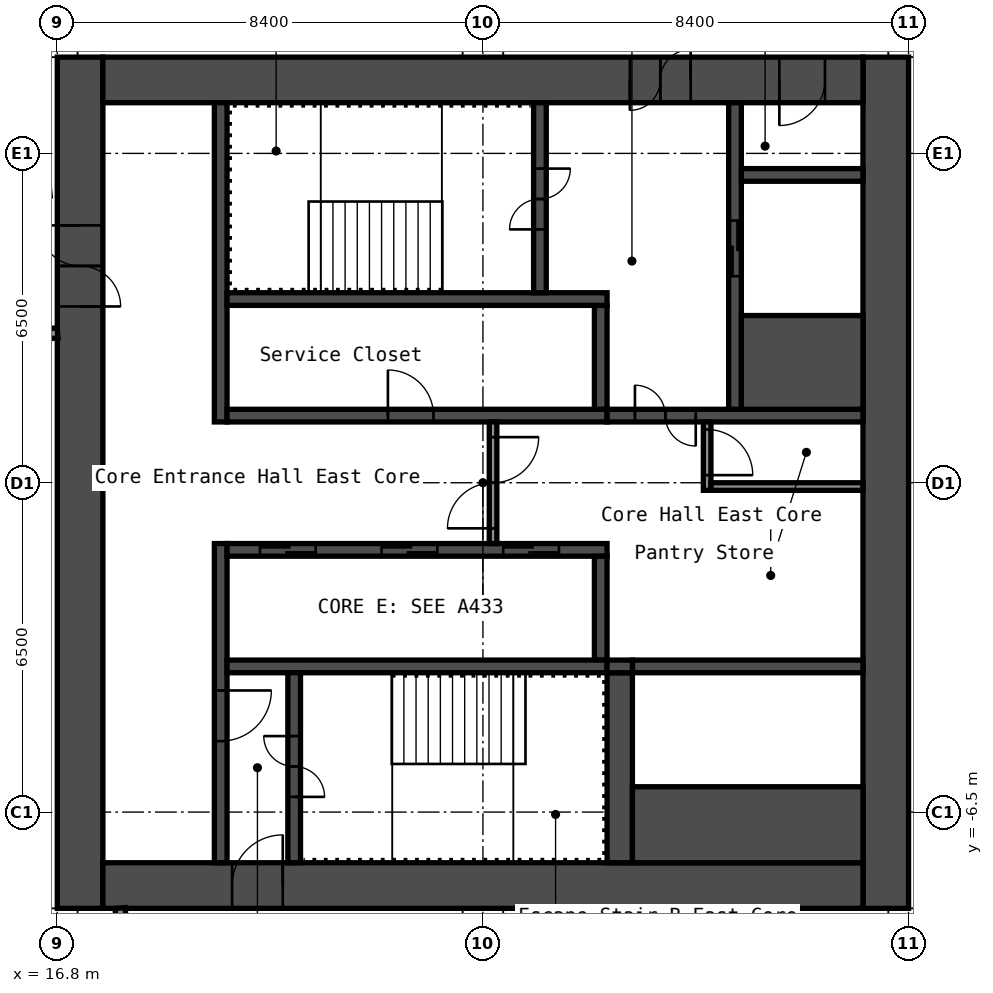
"""IFC4 building model, lengths in metres.
Left out: names, types, materials, properties, quantities, classifications, styles, units other than length and angle.
Written with IfcOpenShell. Run it as: python <this file> out.ifc"""

import sys

from ifc_helpers import new_model, si_unit, direction, frame, frame_2d, origin, place, context, subcontext, project, spatial, rectangle, extrude, element, fill, save


model = new_model("IFC4")
c1 = context("Model", 3, precision=1e-05, world=origin(), true_north=direction((0.0, 1.0)))
c2 = subcontext(c1, "Body", "Model", "MODEL_VIEW")
j1 = project(units=[si_unit("LENGTHUNIT", "METRE"), si_unit("PLANEANGLEUNIT", "RADIAN")], contexts=[c1])
p1 = place(None, origin())
s1 = spatial("IfcSite", under=j1, at=p1, CompositionType="ELEMENT")
p2 = place(p1, origin())
s2 = spatial("IfcBuilding", under=s1, at=p2, CompositionType="ELEMENT")
p3 = place(p2, frame((0.0, 0.0, 228.2)))
s3 = spatial("IfcBuildingStorey", under=s2, at=p3, CompositionType="ELEMENT", Elevation=228.2)
p4 = place(p3, frame((17.25, -8.4, 0.0), z_axis=(0.0, 0.0, 1.0), x_axis=(0.0, 1.0, 0.0)))
e1 = element("IfcWall", 1, at=p4, inside=s3, PredefinedType="SHEAR", context=c2, shape_type="SweptSolid", body=[
    extrude(rectangle(XDim=16.8, YDim=0.9, at=frame_2d((8.4, 0.0))), origin(), (0.0, 0.0, 1.0), 4.1),
])
p5 = place(p4, frame((11.879, 0.0, 0.0)))
e2 = element("IfcOpeningElement", 2, at=p5, cuts=e1, PredefinedType="OPENING", context=c2, shape_type="SweptSolid", body=[
    extrude(rectangle(XDim=1.6, YDim=2.1, at=frame_2d((0.8, 1.05))), frame((0.0, 0.46, 0.0), z_axis=(0.0, -1.0, 0.0), x_axis=(1.0, 0.0, 0.0)), (0.0, 0.0, 1.0), 0.92),
])
p6 = place(p3, frame((33.15, -8.4, 0.0), z_axis=(0.0, 0.0, 1.0), x_axis=(0.0, 1.0, 0.0)))
e3 = element("IfcWall", 3, at=p6, inside=s3, PredefinedType="SHEAR", context=c2, shape_type="SweptSolid", body=[
    extrude(rectangle(XDim=16.8, YDim=0.9, at=frame_2d((8.4, 0.0))), origin(), (0.0, 0.0, 1.0), 4.1),
])
p7 = place(p3, frame((17.7, 7.95, 0.0), z_axis=(0.0, 0.0, 1.0), x_axis=(1.0, 0.0, 0.0)))
e4 = element("IfcWall", 4, at=p7, inside=s3, PredefinedType="SHEAR", context=c2, shape_type="SweptSolid", body=[
    extrude(rectangle(XDim=15.0, YDim=0.9, at=frame_2d((7.5, 0.0))), origin(), (0.0, 0.0, 1.0), 4.1),
])
p8 = place(p7, frame((10.4, 0.0, 0.0)))
e5 = element("IfcOpeningElement", 5, at=p8, cuts=e4, PredefinedType="OPENING", context=c2, shape_type="SweptSolid", body=[
    extrude(rectangle(XDim=1.2, YDim=2.1, at=frame_2d((0.6, 1.05))), frame((0.0, 0.46, 0.0), z_axis=(0.0, -1.0, 0.0), x_axis=(1.0, 0.0, 0.0)), (0.0, 0.0, 1.0), 0.92),
])
p9 = place(p7, frame((13.35, 0.0, 0.0)))
e6 = element("IfcOpeningElement", 6, at=p9, cuts=e4, PredefinedType="OPENING", context=c2, shape_type="SweptSolid", body=[
    extrude(rectangle(XDim=0.9, YDim=2.1, at=frame_2d((0.45, 1.05))), frame((0.0, 0.46, 0.0), z_axis=(0.0, -1.0, 0.0), x_axis=(1.0, 0.0, 0.0)), (0.0, 0.0, 1.0), 0.92),
])
p10 = place(p3, frame((17.7, -7.95, 0.0), z_axis=(0.0, 0.0, 1.0), x_axis=(1.0, 0.0, 0.0)))
e7 = element("IfcWall", 7, at=p10, inside=s3, PredefinedType="SHEAR", context=c2, shape_type="SweptSolid", body=[
    extrude(rectangle(XDim=15.0, YDim=0.9, at=frame_2d((7.5, 0.0))), origin(), (0.0, 0.0, 1.0), 4.1),
])
p11 = place(p10, frame((2.55, 0.0, 0.0)))
e8 = element("IfcOpeningElement", 8, at=p11, cuts=e7, PredefinedType="OPENING", context=c2, shape_type="SweptSolid", body=[
    extrude(rectangle(XDim=1.0, YDim=2.1, at=frame_2d((0.5, 1.05))), frame((0.0, 0.46, 0.0), z_axis=(0.0, -1.0, 0.0), x_axis=(1.0, 0.0, 0.0)), (0.0, 0.0, 1.0), 0.92),
])
p12 = place(p3, frame((20.025, 1.2, 0.0), z_axis=(0.0, 0.0, 1.0), x_axis=(0.0, 1.0, 0.0)))
e9 = element("IfcWall", 9, at=p12, inside=s3, PredefinedType="SHEAR", context=c2, shape_type="SweptSolid", body=[
    extrude(rectangle(XDim=6.3, YDim=0.25, at=frame_2d((3.15, 0.0))), origin(), (0.0, 0.0, 1.0), 4.1),
])
p13 = place(p3, frame((20.025, -7.5, 0.0), z_axis=(0.0, 0.0, 1.0), x_axis=(0.0, 1.0, 0.0)))
e10 = element("IfcWall", 10, at=p13, inside=s3, PredefinedType="SHEAR", context=c2, shape_type="SweptSolid", body=[
    extrude(rectangle(XDim=6.3, YDim=0.25, at=frame_2d((3.15, 0.0))), origin(), (0.0, 0.0, 1.0), 4.1),
])
p14 = place(p13, frame((2.4, 0.0, 0.0)))
e11 = element("IfcOpeningElement", 11, at=p14, cuts=e10, PredefinedType="OPENING", context=c2, shape_type="SweptSolid", body=[
    extrude(rectangle(XDim=1.0, YDim=2.1, at=frame_2d((0.5, 1.05))), frame((0.0, 0.135, 0.0), z_axis=(0.0, -1.0, 0.0), x_axis=(1.0, 0.0, 0.0)), (0.0, 0.0, 1.0), 0.27),
])
p15 = place(p3, frame((20.15, 1.325, 0.0), z_axis=(0.0, 0.0, 1.0), x_axis=(1.0, 0.0, 0.0)))
e12 = element("IfcWall", 12, at=p15, inside=s3, PredefinedType="SHEAR", context=c2, shape_type="SweptSolid", body=[
    extrude(rectangle(XDim=7.5, YDim=0.25, at=frame_2d((3.75, 0.0))), origin(), (0.0, 0.0, 1.0), 4.1),
])
p16 = place(p15, frame((3.175, 0.0, 0.0)))
e13 = element("IfcOpeningElement", 13, at=p16, cuts=e12, PredefinedType="OPENING", context=c2, shape_type="SweptSolid", body=[
    extrude(rectangle(XDim=0.9, YDim=2.1, at=frame_2d((0.45, 1.05))), frame((0.0, 0.135, 0.0), z_axis=(0.0, -1.0, 0.0), x_axis=(1.0, 0.0, 0.0)), (0.0, 0.0, 1.0), 0.27),
])
p17 = place(p3, frame((27.525, 1.45, 0.0), z_axis=(0.0, 0.0, 1.0), x_axis=(0.0, 1.0, 0.0)))
e14 = element("IfcWall", 14, at=p17, inside=s3, PredefinedType="SHEAR", context=c2, shape_type="SweptSolid", body=[
    extrude(rectangle(XDim=2.05, YDim=0.25, at=frame_2d((1.025, 0.0))), origin(), (0.0, 0.0, 1.0), 4.1),
])
p18 = place(p3, frame((20.15, 3.625, 0.0), z_axis=(0.0, 0.0, 1.0), x_axis=(1.0, 0.0, 0.0)))
e15 = element("IfcWall", 15, at=p18, inside=s3, PredefinedType="SHEAR", context=c2, shape_type="SweptSolid", body=[
    extrude(rectangle(XDim=7.5, YDim=0.25, at=frame_2d((3.75, 0.0))), origin(), (0.0, 0.0, 1.0), 4.1),
])
p19 = place(p3, frame((26.325, 3.75, 0.0), z_axis=(0.0, 0.0, 1.0), x_axis=(0.0, 1.0, 0.0)))
e16 = element("IfcWall", 16, at=p19, inside=s3, PredefinedType="SHEAR", context=c2, shape_type="SweptSolid", body=[
    extrude(rectangle(XDim=3.75, YDim=0.25, at=frame_2d((1.875, 0.0))), origin(), (0.0, 0.0, 1.0), 4.1),
])
p20 = place(p19, frame((1.25, 0.0, 0.0)))
e17 = element("IfcOpeningElement", 17, at=p20, cuts=e16, PredefinedType="OPENING", context=c2, shape_type="SweptSolid", body=[
    extrude(rectangle(XDim=1.2, YDim=2.1, at=frame_2d((0.6, 1.05))), frame((0.0, 0.135, 0.0), z_axis=(0.0, -1.0, 0.0), x_axis=(1.0, 0.0, 0.0)), (0.0, 0.0, 1.0), 0.27),
])
p21 = place(p3, frame((27.65, 1.325, 0.0), z_axis=(0.0, 0.0, 1.0), x_axis=(1.0, 0.0, 0.0)))
e18 = element("IfcWall", 18, at=p21, inside=s3, PredefinedType="SHEAR", context=c2, shape_type="SweptSolid", body=[
    extrude(rectangle(XDim=5.05, YDim=0.25, at=frame_2d((2.525, 0.0))), origin(), (0.0, 0.0, 1.0), 4.1),
])
p22 = place(p21, frame((0.55, 0.0, 0.0)))
e19 = element("IfcOpeningElement", 19, at=p22, cuts=e18, PredefinedType="OPENING", context=c2, shape_type="SweptSolid", body=[
    extrude(rectangle(XDim=1.2, YDim=2.1, at=frame_2d((0.6, 1.05))), frame((0.0, 0.135, 0.0), z_axis=(0.0, -1.0, 0.0), x_axis=(1.0, 0.0, 0.0)), (0.0, 0.0, 1.0), 0.27),
])
p23 = place(p3, frame((30.175, 1.45, 0.0), z_axis=(0.0, 0.0, 1.0), x_axis=(0.0, 1.0, 0.0)))
e20 = element("IfcWall", 20, at=p23, inside=s3, PredefinedType="SHEAR", context=c2, shape_type="SweptSolid", body=[
    extrude(rectangle(XDim=6.05, YDim=0.25, at=frame_2d((3.025, 0.0))), origin(), (0.0, 0.0, 1.0), 4.1),
])
p24 = place(p23, frame((2.625, 0.0, 0.0)))
e21 = element("IfcOpeningElement", 21, at=p24, cuts=e20, PredefinedType="OPENING", context=c2, shape_type="SweptSolid", body=[
    extrude(rectangle(XDim=1.1, YDim=2.1, at=frame_2d((0.55, 1.05))), frame((0.0, 0.135, 0.0), z_axis=(0.0, -1.0, 0.0), x_axis=(1.0, 0.0, 0.0)), (0.0, 0.0, 1.0), 0.27),
])
p25 = place(p3, frame((30.3, 2.375, 0.0), z_axis=(0.0, 0.0, 1.0), x_axis=(1.0, 0.0, 0.0)))
e22 = element("IfcWall", 22, at=p25, inside=s3, PredefinedType="SHEAR", context=c2, shape_type="SweptSolid", body=[
    extrude(rectangle(XDim=2.4, YDim=1.85, at=frame_2d((1.2, 0.0))), origin(), (0.0, 0.0, 1.0), 4.1),
])
p26 = place(p3, frame((30.3, 6.075, 0.0), z_axis=(0.0, 0.0, 1.0), x_axis=(1.0, 0.0, 0.0)))
e23 = element("IfcWall", 23, at=p26, inside=s3, PredefinedType="SHEAR", context=c2, shape_type="SweptSolid", body=[
    extrude(rectangle(XDim=2.4, YDim=0.25, at=frame_2d((1.2, 0.0))), origin(), (0.0, 0.0, 1.0), 4.1),
])
p27 = place(p3, frame((20.15, -1.325, 0.0), z_axis=(0.0, 0.0, 1.0), x_axis=(1.0, 0.0, 0.0)))
e24 = element("IfcWall", 24, at=p27, inside=s3, PredefinedType="SHEAR", context=c2, shape_type="SweptSolid", body=[
    extrude(rectangle(XDim=7.5, YDim=0.25, at=frame_2d((3.75, 0.0))), origin(), (0.0, 0.0, 1.0), 4.1),
])
p28 = place(p27, frame((0.65, 0.0, 0.0)))
e25 = element("IfcOpeningElement", 25, at=p28, cuts=e24, PredefinedType="OPENING", context=c2, shape_type="SweptSolid", body=[
    extrude(rectangle(XDim=1.1, YDim=2.1, at=frame_2d((0.55, 1.05))), frame((0.0, 0.135, 0.0), z_axis=(0.0, -1.0, 0.0), x_axis=(1.0, 0.0, 0.0)), (0.0, 0.0, 1.0), 0.27),
])
p29 = place(p27, frame((3.05, 0.0, 0.0)))
e26 = element("IfcOpeningElement", 26, at=p29, cuts=e24, PredefinedType="OPENING", context=c2, shape_type="SweptSolid", body=[
    extrude(rectangle(XDim=1.1, YDim=2.1, at=frame_2d((0.55, 1.05))), frame((0.0, 0.135, 0.0), z_axis=(0.0, -1.0, 0.0), x_axis=(1.0, 0.0, 0.0)), (0.0, 0.0, 1.0), 0.27),
])
p30 = place(p27, frame((5.45, 0.0, 0.0)))
e27 = element("IfcOpeningElement", 27, at=p30, cuts=e24, PredefinedType="OPENING", context=c2, shape_type="SweptSolid", body=[
    extrude(rectangle(XDim=1.1, YDim=2.1, at=frame_2d((0.55, 1.05))), frame((0.0, 0.135, 0.0), z_axis=(0.0, -1.0, 0.0), x_axis=(1.0, 0.0, 0.0)), (0.0, 0.0, 1.0), 0.27),
])
p31 = place(p3, frame((27.525, -3.5, 0.0), z_axis=(0.0, 0.0, 1.0), x_axis=(0.0, 1.0, 0.0)))
e28 = element("IfcWall", 28, at=p31, inside=s3, PredefinedType="SHEAR", context=c2, shape_type="SweptSolid", body=[
    extrude(rectangle(XDim=2.05, YDim=0.25, at=frame_2d((1.025, 0.0))), origin(), (0.0, 0.0, 1.0), 4.1),
])
p32 = place(p3, frame((20.15, -3.625, 0.0), z_axis=(0.0, 0.0, 1.0), x_axis=(1.0, 0.0, 0.0)))
e29 = element("IfcWall", 29, at=p32, inside=s3, PredefinedType="SHEAR", context=c2, shape_type="SweptSolid", body=[
    extrude(rectangle(XDim=7.5, YDim=0.25, at=frame_2d((3.75, 0.0))), origin(), (0.0, 0.0, 1.0), 4.1),
])
p33 = place(p3, frame((21.475, -7.5, 0.0), z_axis=(0.0, 0.0, 1.0), x_axis=(0.0, 1.0, 0.0)))
e30 = element("IfcWall", 30, at=p33, inside=s3, PredefinedType="SHEAR", context=c2, shape_type="SweptSolid", body=[
    extrude(rectangle(XDim=3.75, YDim=0.25, at=frame_2d((1.875, 0.0))), origin(), (0.0, 0.0, 1.0), 4.1),
])
p34 = place(p33, frame((1.3, 0.0, 0.0)))
e31 = element("IfcOpeningElement", 31, at=p34, cuts=e30, PredefinedType="OPENING", context=c2, shape_type="SweptSolid", body=[
    extrude(rectangle(XDim=1.2, YDim=2.1, at=frame_2d((0.6, 1.05))), frame((0.0, 0.135, 0.0), z_axis=(0.0, -1.0, 0.0), x_axis=(1.0, 0.0, 0.0)), (0.0, 0.0, 1.0), 0.27),
])
p35 = place(p3, frame((27.9, -7.5, 0.0), z_axis=(0.0, 0.0, 1.0), x_axis=(0.0, 1.0, 0.0)))
e32 = element("IfcWall", 32, at=p35, inside=s3, PredefinedType="SHEAR", context=c2, shape_type="SweptSolid", body=[
    extrude(rectangle(XDim=3.75, YDim=0.5, at=frame_2d((1.875, 0.0))), origin(), (0.0, 0.0, 1.0), 4.1),
])
p36 = place(p3, frame((28.15, -3.625, 0.0), z_axis=(0.0, 0.0, 1.0), x_axis=(1.0, 0.0, 0.0)))
e33 = element("IfcWall", 33, at=p36, inside=s3, PredefinedType="SHEAR", context=c2, shape_type="SweptSolid", body=[
    extrude(rectangle(XDim=4.55, YDim=0.25, at=frame_2d((2.275, 0.0))), origin(), (0.0, 0.0, 1.0), 4.1),
])
p37 = place(p3, frame((28.15, -6.75, 0.0), z_axis=(0.0, 0.0, 1.0), x_axis=(1.0, 0.0, 0.0)))
e34 = element("IfcWall", 34, at=p37, inside=s3, PredefinedType="SHEAR", context=c2, shape_type="SweptSolid", body=[
    extrude(rectangle(XDim=4.55, YDim=1.5, at=frame_2d((2.275, 0.0))), origin(), (0.0, 0.0, 1.0), 4.1),
])
p38 = place(p3, frame((27.65, -3.625, 0.0), z_axis=(0.0, 0.0, 1.0), x_axis=(1.0, 0.0, 0.0)))
e35 = element("IfcWall", 35, at=p38, inside=s3, PredefinedType="SHEAR", context=c2, shape_type="SweptSolid", body=[
    extrude(rectangle(XDim=0.5, YDim=0.25, at=frame_2d((0.25, 0.0))), origin(), (0.0, 0.0, 1.0), 4.1),
])
p39 = place(p3, frame((25.4, -1.2, 0.0), z_axis=(0.0, 0.0, 1.0), x_axis=(0.0, 1.0, 0.0)))
e36 = element("IfcWall", 36, at=p39, inside=s3, PredefinedType="PARTITIONING", context=c2, shape_type="SweptSolid", body=[
    extrude(rectangle(XDim=2.4, YDim=0.15, at=frame_2d((1.2, 0.0))), origin(), (0.0, 0.0, 1.0), 4.1),
])
p40 = place(p39, frame((0.3, 0.0, 0.0)))
e37 = element("IfcOpeningElement", 37, at=p40, cuts=e36, PredefinedType="OPENING", context=c2, shape_type="SweptSolid", body=[
    extrude(rectangle(XDim=1.8, YDim=2.1, at=frame_2d((0.9, 1.05))), frame((0.0, 0.085, 0.0), z_axis=(0.0, -1.0, 0.0), x_axis=(1.0, 0.0, 0.0)), (0.0, 0.0, 1.0), 0.17),
])
p41 = place(p3, frame((29.625, -0.15, 0.0), z_axis=(0.0, 0.0, 1.0), x_axis=(0.0, 1.0, 0.0)))
e38 = element("IfcWall", 38, at=p41, inside=s3, PredefinedType="PARTITIONING", context=c2, shape_type="SweptSolid", body=[
    extrude(rectangle(XDim=1.35, YDim=0.15, at=frame_2d((0.675, 0.0))), origin(), (0.0, 0.0, 1.0), 4.1),
])
p42 = place(p41, frame((0.3, 0.0, 0.0)))
e39 = element("IfcOpeningElement", 39, at=p42, cuts=e38, PredefinedType="OPENING", context=c2, shape_type="SweptSolid", body=[
    extrude(rectangle(XDim=0.9, YDim=2.1, at=frame_2d((0.45, 1.05))), frame((0.0, 0.085, 0.0), z_axis=(0.0, -1.0, 0.0), x_axis=(1.0, 0.0, 0.0)), (0.0, 0.0, 1.0), 0.17),
])
p43 = place(p3, frame((29.7, -0.075, 0.0), z_axis=(0.0, 0.0, 1.0), x_axis=(1.0, 0.0, 0.0)))
e40 = element("IfcWall", 40, at=p43, inside=s3, PredefinedType="PARTITIONING", context=c2, shape_type="SweptSolid", body=[
    extrude(rectangle(XDim=3.0, YDim=0.15, at=frame_2d((1.5, 0.0))), origin(), (0.0, 0.0, 1.0), 4.1),
])
p44 = place(p3, frame((-16.572, -0.549, 0.0), z_axis=(0.0, 0.0, 1.0), x_axis=(0.994521146831, 0.104535584879, 0.0)))
e41 = element("IfcWall", 41, at=p44, inside=s3, PredefinedType="PARTITIONING", context=c2, shape_type="SweptSolid", body=[
    extrude(rectangle(XDim=33.561, YDim=0.2, at=frame_2d((16.78, 0.0))), origin(), (0.0, 0.0, 1.0), 4.1),
])
p45 = place(p44, frame((3.75, 0.0, 0.0)))
e42 = element("IfcOpeningElement", 42, at=p45, cuts=e41, PredefinedType="OPENING", context=c2, shape_type="SweptSolid", body=[
    extrude(rectangle(XDim=0.9, YDim=2.1, at=frame_2d((0.45, 1.05))), frame((0.0, 0.11, 0.0), z_axis=(0.0, -1.0, 0.0), x_axis=(1.0, 0.0, 0.0)), (0.0, 0.0, 1.0), 0.22),
])
p46 = place(p44, frame((11.8, 0.0, 0.0)))
e43 = element("IfcOpeningElement", 43, at=p46, cuts=e41, PredefinedType="OPENING", context=c2, shape_type="SweptSolid", body=[
    extrude(rectangle(XDim=1.6, YDim=2.1, at=frame_2d((0.8, 1.05))), frame((0.0, 0.11, 0.0), z_axis=(0.0, -1.0, 0.0), x_axis=(1.0, 0.0, 0.0)), (0.0, 0.0, 1.0), 0.22),
])
p47 = place(p44, frame((20.2, 0.0, 0.0)))
e44 = element("IfcOpeningElement", 44, at=p47, cuts=e41, PredefinedType="OPENING", context=c2, shape_type="SweptSolid", body=[
    extrude(rectangle(XDim=1.6, YDim=2.1, at=frame_2d((0.8, 1.05))), frame((0.0, 0.11, 0.0), z_axis=(0.0, -1.0, 0.0), x_axis=(1.0, 0.0, 0.0)), (0.0, 0.0, 1.0), 0.22),
])
p48 = place(p44, frame((28.6, 0.0, 0.0)))
e45 = element("IfcOpeningElement", 45, at=p48, cuts=e41, PredefinedType="OPENING", context=c2, shape_type="SweptSolid", body=[
    extrude(rectangle(XDim=1.6, YDim=2.1, at=frame_2d((0.8, 1.05))), frame((0.0, 0.11, 0.0), z_axis=(0.0, -1.0, 0.0), x_axis=(1.0, 0.0, 0.0)), (0.0, 0.0, 1.0), 0.22),
])
p49 = place(p3, frame((18.965, -17.216, 0.0), z_axis=(0.0, 0.0, 1.0), x_axis=(-0.104541500485, 0.994520525015, 0.0)))
e46 = element("IfcWall", 46, at=p49, inside=s3, PredefinedType="PARTITIONING", context=c2, shape_type="SweptSolid", body=[
    extrude(rectangle(XDim=8.87, YDim=0.2, at=frame_2d((4.435, 0.0))), origin(), (0.0, 0.0, 1.0), 4.1),
])
p50 = place(p5, origin())
e47 = element("IfcDoor", 47, at=p50, inside=s3, OperationType="DOUBLE_DOOR_SINGLE_SWING", PredefinedType="DOOR", context=c2, shape_type="SweptSolid", body=[
    extrude(rectangle(XDim=1.6, YDim=2.1, at=frame_2d((0.8, 1.05))), frame((0.0, 0.025, 0.0), z_axis=(0.0, -1.0, 0.0), x_axis=(1.0, 0.0, 0.0)), (0.0, 0.0, 1.0), 0.05),
])
fill(e2, e47)
p51 = place(p8, origin())
e48 = element("IfcDoor", 48, at=p51, inside=s3, OperationType="DOUBLE_DOOR_SINGLE_SWING", PredefinedType="DOOR", context=c2, shape_type="SweptSolid", body=[
    extrude(rectangle(XDim=1.2, YDim=2.1, at=frame_2d((0.6, 1.05))), frame((0.0, 0.025, 0.0), z_axis=(0.0, -1.0, 0.0), x_axis=(1.0, 0.0, 0.0)), (0.0, 0.0, 1.0), 0.05),
])
fill(e5, e48)
p52 = place(p9, origin())
e49 = element("IfcDoor", 49, at=p52, inside=s3, OperationType="SINGLE_SWING_LEFT", PredefinedType="DOOR", context=c2, shape_type="SweptSolid", body=[
    extrude(rectangle(XDim=0.9, YDim=2.1, at=frame_2d((0.45, 1.05))), frame((0.0, 0.025, 0.0), z_axis=(0.0, -1.0, 0.0), x_axis=(1.0, 0.0, 0.0)), (0.0, 0.0, 1.0), 0.05),
])
fill(e6, e49)
p53 = place(p11, origin())
e50 = element("IfcDoor", 50, at=p53, inside=s3, OperationType="SINGLE_SWING_LEFT", PredefinedType="DOOR", context=c2, shape_type="SweptSolid", body=[
    extrude(rectangle(XDim=1.0, YDim=2.1, at=frame_2d((0.5, 1.05))), frame((0.0, 0.025, 0.0), z_axis=(0.0, -1.0, 0.0), x_axis=(1.0, 0.0, 0.0)), (0.0, 0.0, 1.0), 0.05),
])
fill(e8, e50)
p54 = place(p20, origin())
e51 = element("IfcDoor", 51, at=p54, inside=s3, OperationType="DOUBLE_DOOR_SINGLE_SWING", PredefinedType="DOOR", context=c2, shape_type="SweptSolid", body=[
    extrude(rectangle(XDim=1.2, YDim=2.1, at=frame_2d((0.6, 1.05))), frame((0.0, 0.025, 0.0), z_axis=(0.0, -1.0, 0.0), x_axis=(1.0, 0.0, 0.0)), (0.0, 0.0, 1.0), 0.05),
])
fill(e17, e51)
p55 = place(p34, origin())
e52 = element("IfcDoor", 52, at=p55, inside=s3, OperationType="DOUBLE_DOOR_SINGLE_SWING", PredefinedType="DOOR", context=c2, shape_type="SweptSolid", body=[
    extrude(rectangle(XDim=1.2, YDim=2.1, at=frame_2d((0.6, 1.05))), frame((0.0, 0.025, 0.0), z_axis=(0.0, -1.0, 0.0), x_axis=(1.0, 0.0, 0.0)), (0.0, 0.0, 1.0), 0.05),
])
fill(e31, e52)
p56 = place(p14, origin())
e53 = element("IfcDoor", 53, at=p56, inside=s3, OperationType="SINGLE_SWING_RIGHT", PredefinedType="DOOR", context=c2, shape_type="SweptSolid", body=[
    extrude(rectangle(XDim=1.0, YDim=2.1, at=frame_2d((0.5, 1.05))), frame((0.0, 0.025, 0.0), z_axis=(0.0, -1.0, 0.0), x_axis=(1.0, 0.0, 0.0)), (0.0, 0.0, 1.0), 0.05),
])
fill(e11, e53)
p57 = place(p22, origin())
e54 = element("IfcDoor", 54, at=p57, inside=s3, OperationType="DOUBLE_DOOR_SINGLE_SWING", PredefinedType="DOOR", context=c2, shape_type="SweptSolid", body=[
    extrude(rectangle(XDim=1.2, YDim=2.1, at=frame_2d((0.6, 1.05))), frame((0.0, 0.025, 0.0), z_axis=(0.0, -1.0, 0.0), x_axis=(1.0, 0.0, 0.0)), (0.0, 0.0, 1.0), 0.05),
])
fill(e19, e54)
p58 = place(p40, origin())
e55 = element("IfcDoor", 55, at=p58, inside=s3, OperationType="DOUBLE_DOOR_SINGLE_SWING", PredefinedType="DOOR", context=c2, shape_type="SweptSolid", body=[
    extrude(rectangle(XDim=1.8, YDim=2.1, at=frame_2d((0.9, 1.05))), frame((0.0, 0.025, 0.0), z_axis=(0.0, -1.0, 0.0), x_axis=(1.0, 0.0, 0.0)), (0.0, 0.0, 1.0), 0.05),
])
fill(e37, e55)
p59 = place(p42, origin())
e56 = element("IfcDoor", 56, at=p59, inside=s3, OperationType="SINGLE_SWING_LEFT", PredefinedType="DOOR", context=c2, shape_type="SweptSolid", body=[
    extrude(rectangle(XDim=0.9, YDim=2.1, at=frame_2d((0.45, 1.05))), frame((0.0, 0.025, 0.0), z_axis=(0.0, -1.0, 0.0), x_axis=(1.0, 0.0, 0.0)), (0.0, 0.0, 1.0), 0.05),
])
fill(e39, e56)
p60 = place(p16, origin())
e57 = element("IfcDoor", 57, at=p60, inside=s3, OperationType="SINGLE_SWING_RIGHT", PredefinedType="DOOR", context=c2, shape_type="SweptSolid", body=[
    extrude(rectangle(XDim=0.9, YDim=2.1, at=frame_2d((0.45, 1.05))), frame((0.0, 0.025, 0.0), z_axis=(0.0, -1.0, 0.0), x_axis=(1.0, 0.0, 0.0)), (0.0, 0.0, 1.0), 0.05),
])
fill(e13, e57)
p61 = place(p28, origin())
e58 = element("IfcDoor", 58, at=p61, inside=s3, OperationType="DOUBLE_DOOR_SLIDING", PredefinedType="DOOR", context=c2, shape_type="SweptSolid", body=[
    extrude(rectangle(XDim=1.1, YDim=2.1, at=frame_2d((0.55, 1.05))), frame((0.0, 0.025, 0.0), z_axis=(0.0, -1.0, 0.0), x_axis=(1.0, 0.0, 0.0)), (0.0, 0.0, 1.0), 0.05),
])
fill(e25, e58)
p62 = place(p29, origin())
e59 = element("IfcDoor", 59, at=p62, inside=s3, OperationType="DOUBLE_DOOR_SLIDING", PredefinedType="DOOR", context=c2, shape_type="SweptSolid", body=[
    extrude(rectangle(XDim=1.1, YDim=2.1, at=frame_2d((0.55, 1.05))), frame((0.0, 0.025, 0.0), z_axis=(0.0, -1.0, 0.0), x_axis=(1.0, 0.0, 0.0)), (0.0, 0.0, 1.0), 0.05),
])
fill(e26, e59)
p63 = place(p30, origin())
e60 = element("IfcDoor", 60, at=p63, inside=s3, OperationType="DOUBLE_DOOR_SLIDING", PredefinedType="DOOR", context=c2, shape_type="SweptSolid", body=[
    extrude(rectangle(XDim=1.1, YDim=2.1, at=frame_2d((0.55, 1.05))), frame((0.0, 0.025, 0.0), z_axis=(0.0, -1.0, 0.0), x_axis=(1.0, 0.0, 0.0)), (0.0, 0.0, 1.0), 0.05),
])
fill(e27, e60)
p64 = place(p24, origin())
e61 = element("IfcDoor", 61, at=p64, inside=s3, OperationType="DOUBLE_DOOR_SLIDING", PredefinedType="DOOR", context=c2, shape_type="SweptSolid", body=[
    extrude(rectangle(XDim=1.1, YDim=2.1, at=frame_2d((0.55, 1.05))), frame((0.0, 0.025, 0.0), z_axis=(0.0, -1.0, 0.0), x_axis=(1.0, 0.0, 0.0)), (0.0, 0.0, 1.0), 0.05),
])
fill(e21, e61)
save(model, sys.argv[1])
